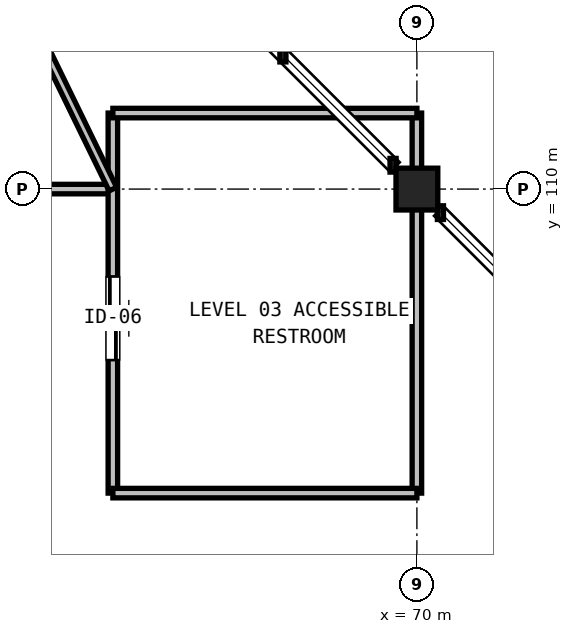
"""IFC4 building model, lengths in metres.
Left out: names, types, materials, properties, quantities, classifications, styles, units other than length and angle.
Written with IfcOpenShell. Run it as: python <this file> out.ifc"""

import sys

from ifc_helpers import new_model, si_unit, direction, frame, frame_2d, origin, origin_2d, place, context, subcontext, project, spatial, rectangle, extrude, element, fill, save


model = new_model("IFC4")
c1 = context("Model", 3, precision=1e-05, world=origin(), true_north=direction((0.0, 1.0)))
c2 = subcontext(c1, "Body", "Model", "MODEL_VIEW")
j1 = project(units=[si_unit("LENGTHUNIT", "METRE"), si_unit("PLANEANGLEUNIT", "RADIAN")], contexts=[c1])
p1 = place(None, origin())
s1 = spatial("IfcSite", under=j1, at=p1, CompositionType="ELEMENT")
p2 = place(p1, origin())
s2 = spatial("IfcBuilding", under=s1, at=p2, CompositionType="ELEMENT")
p3 = place(p2, frame((0.0, 0.0, 15.0)))
s3 = spatial("IfcBuildingStorey", under=s2, at=p3, CompositionType="ELEMENT", Elevation=15.0)
p4 = place(p3, frame((70.0, 110.0, 0.0), z_axis=(0.0, 0.0, 1.0), x_axis=(1.0, 0.0, 0.0)))
e1 = element("IfcColumn", 1, at=p4, inside=s3, PredefinedType="COLUMN", context=c2, shape_type="SweptSolid", body=[
    extrude(rectangle(XDim=0.55, YDim=0.55, at=origin_2d()), origin(), (0.0, 0.0, 1.0), 4.2),
])
p5 = place(p3, frame((54.275, 110.0, 0.0), z_axis=(0.0, 0.0, 1.0), x_axis=(1.0, 0.0, 0.0)))
e2 = element("IfcWall", 2, at=p5, inside=s3, PredefinedType="PARTITIONING", context=c2, shape_type="SweptSolid", body=[
    extrude(rectangle(XDim=11.725, YDim=0.125, at=frame_2d((5.863, 0.0))), origin(), (0.0, 0.0, 1.0), 3.03),
])
p6 = place(p5, frame((4.69, 0.0, 0.0)))
e3 = element("IfcOpeningElement", 3, at=p6, cuts=e2, PredefinedType="OPENING", context=c2, shape_type="SweptSolid", body=[
    extrude(rectangle(XDim=1.4, YDim=2.2, at=frame_2d((0.7, 1.1))), frame((0.0, 0.073, 0.0), z_axis=(0.0, -1.0, 0.0), x_axis=(1.0, 0.0, 0.0)), (0.0, 0.0, 1.0), 0.145),
])
p7 = place(p3, frame((66.0, 106.0, 0.0), z_axis=(0.0, 0.0, 1.0), x_axis=(0.0, 1.0, 0.0)))
e4 = element("IfcWall", 4, at=p7, inside=s3, PredefinedType="PARTITIONING", context=c2, shape_type="SweptSolid", body=[
    extrude(rectangle(XDim=5.0, YDim=0.125, at=frame_2d((2.5, 0.0))), origin(), (0.0, 0.0, 1.0), 3.9),
])
p8 = place(p7, frame((1.75, 0.0, 0.0)))
e5 = element("IfcOpeningElement", 5, at=p8, cuts=e4, PredefinedType="OPENING", context=c2, shape_type="SweptSolid", body=[
    extrude(rectangle(XDim=1.1, YDim=2.15, at=frame_2d((0.55, 1.075))), frame((0.0, 0.073, 0.0), z_axis=(0.0, -1.0, 0.0), x_axis=(1.0, 0.0, 0.0)), (0.0, 0.0, 1.0), 0.145),
])
p9 = place(p3, frame((70.0, 106.0, 0.0), z_axis=(0.0, 0.0, 1.0), x_axis=(0.0, 1.0, 0.0)))
e6 = element("IfcWall", 6, at=p9, inside=s3, PredefinedType="PARTITIONING", context=c2, shape_type="SweptSolid", body=[
    extrude(rectangle(XDim=5.0, YDim=0.125, at=frame_2d((2.5, 0.0))), origin(), (0.0, 0.0, 1.0), 3.18),
])
for number, where, z_axis, x_axis in (
    (7, (66.0, 111.0, 0.0), (0.0, 0.0, 1.0), (1.0, 0.0, 0.0)),
    (8, (66.0, 106.0, 0.0), (0.0, 0.0, 1.0), (1.0, 0.0, 0.0)),
):
    element("IfcWall", number, at=place(p3, frame(where, z_axis=z_axis, x_axis=x_axis)), inside=s3, PredefinedType="PARTITIONING", context=c2, shape_type="SweptSolid", body=[
        extrude(rectangle(XDim=4.0, YDim=0.125, at=frame_2d((2.0, 0.0))), origin(), (0.0, 0.0, 1.0), 3.9),
    ])
p10 = place(p3, frame((66.0, 110.0, 0.0), z_axis=(0.0, 0.0, 1.0), x_axis=(-0.437715033668, 0.899113757709, 0.0)))
e9 = element("IfcWall", 9, at=p10, inside=s3, PredefinedType="PARTITIONING", context=c2, shape_type="SweptSolid", body=[
    extrude(rectangle(XDim=8.453, YDim=0.11, at=frame_2d((4.227, 0.0))), origin(), (0.0, 0.0, 1.0), 3.9),
])
p11 = place(p8, frame((1.1, 0.0, 0.0), z_axis=(0.0, 0.0, 1.0), x_axis=(-1.0, 0.0, 0.0)))
e10 = element("IfcDoor", 10, at=p11, inside=s3, OperationType="SLIDING_TO_RIGHT", PredefinedType="DOOR", context=c2, shape_type="SweptSolid", body=[
    extrude(rectangle(XDim=1.1, YDim=2.15, at=frame_2d((0.55, 1.075))), frame((0.0, 0.025, 0.0), z_axis=(0.0, -1.0, 0.0), x_axis=(1.0, 0.0, 0.0)), (0.0, 0.0, 1.0), 0.05),
])
fill(e5, e10)
save(model, sys.argv[1])
